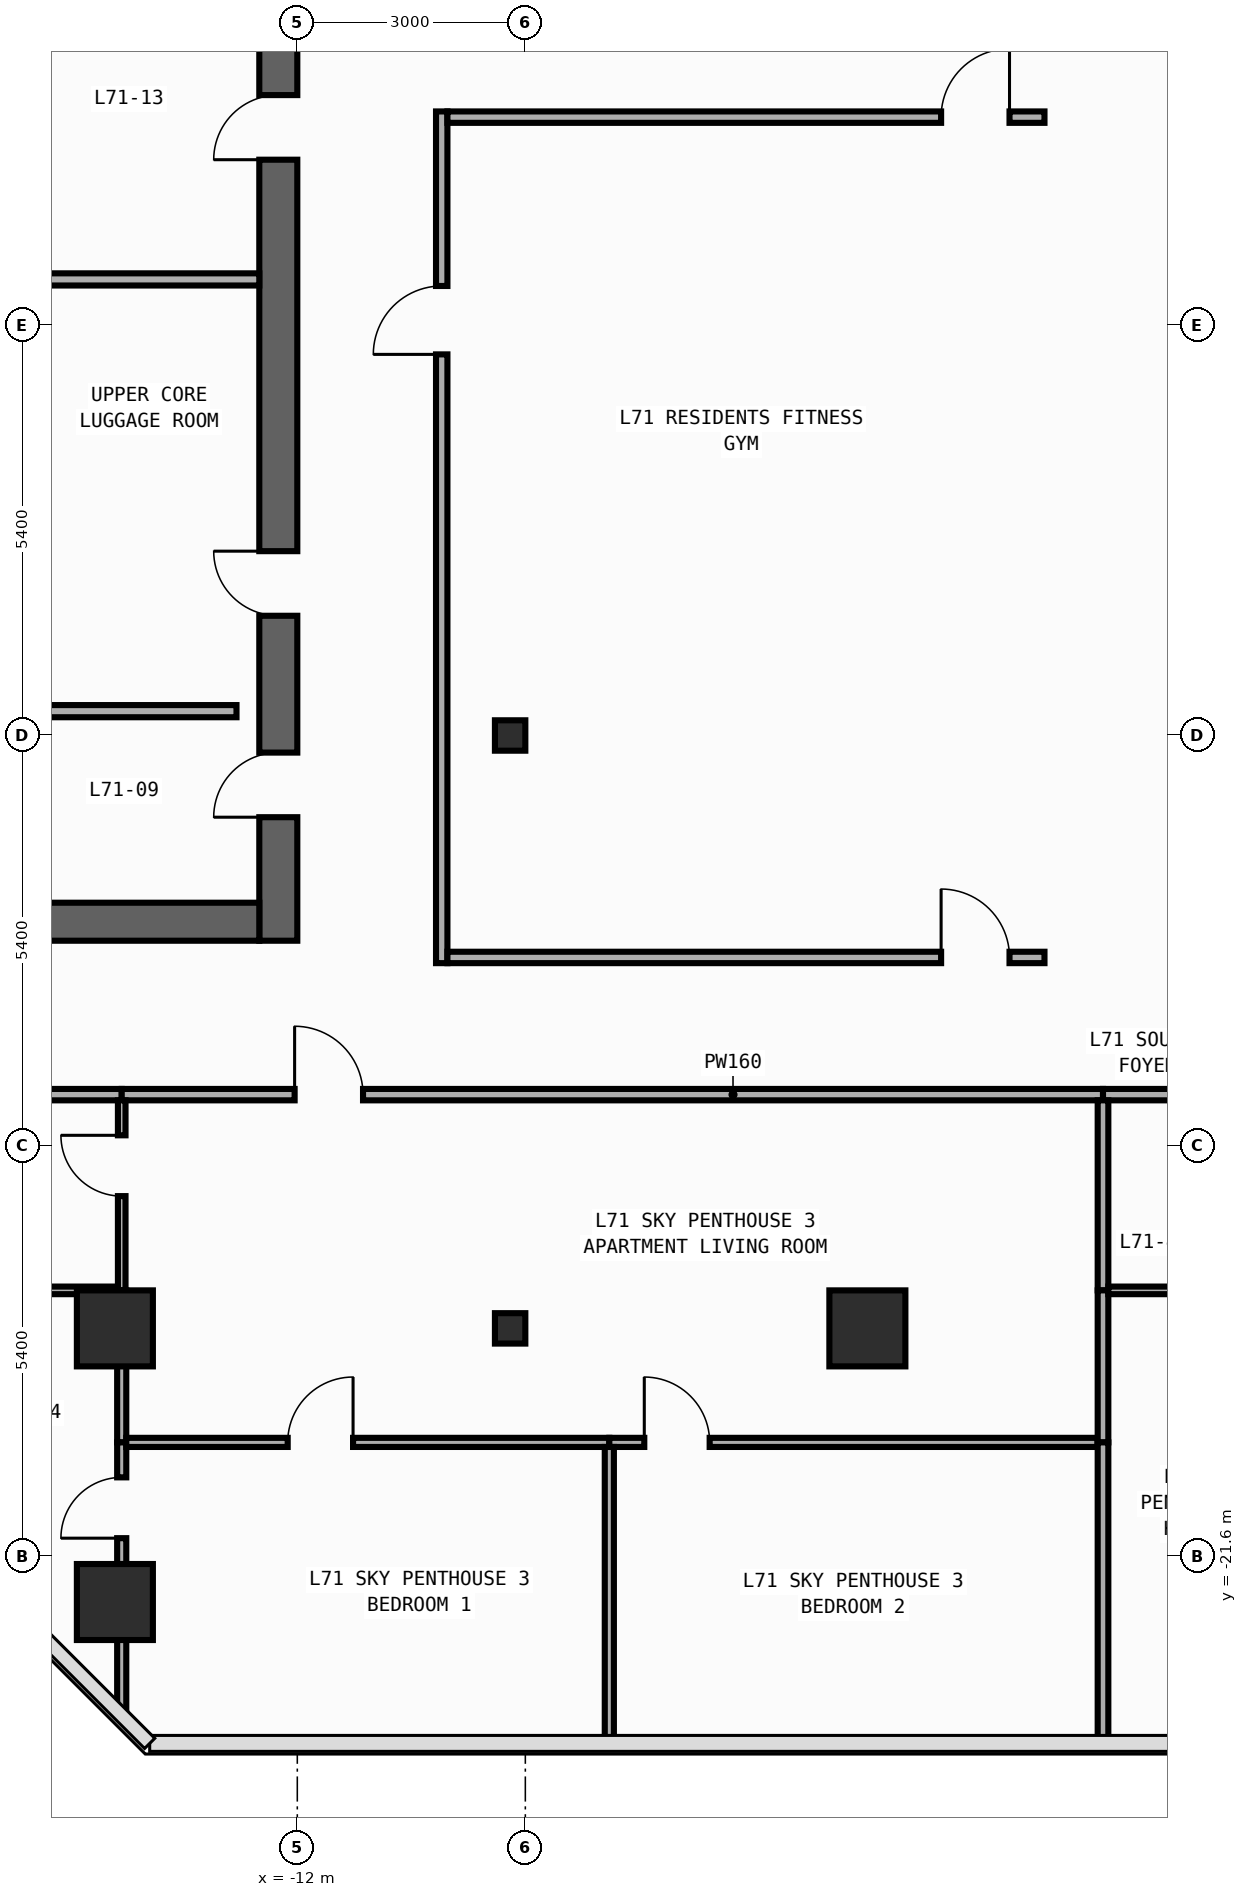
"""IFC4 building model, lengths in metres.
Left out: names, types, materials, properties, quantities, classifications, styles, units other than length and angle.
Written with IfcOpenShell. Run it as: python <this file> out.ifc"""

import sys

from ifc_helpers import new_model, si_unit, direction, frame, frame_2d, origin, origin_2d, place, context, subcontext, project, spatial, rectangle, circle, i_section, extrude, element, fill, save


model = new_model("IFC4")
c1 = context("Model", 3, precision=1e-05, world=origin(), true_north=direction((0.0, 1.0)))
c2 = subcontext(c1, "Body", "Model", "MODEL_VIEW")
j1 = project(units=[si_unit("LENGTHUNIT", "METRE"), si_unit("PLANEANGLEUNIT", "RADIAN")], contexts=[c1])
p1 = place(None, origin())
s1 = spatial("IfcSite", under=j1, at=p1, CompositionType="ELEMENT")
p2 = place(p1, origin())
s2 = spatial("IfcBuilding", under=s1, at=p2, CompositionType="ELEMENT")
p3 = place(p2, frame((0.0, 0.0, 296.6)))
s3 = spatial("IfcBuildingStorey", under=s2, at=p3, CompositionType="ELEMENT", Elevation=296.6)
p4 = place(p3, frame((-12.25, -13.5, 0.0), z_axis=(0.0, 0.0, 1.0), x_axis=(0.0, 1.0, 0.0)))
e1 = element("IfcWall", 1, at=p4, inside=s3, PredefinedType="SHEAR", context=c2, shape_type="SweptSolid", body=[
    extrude(rectangle(XDim=27.0, YDim=0.5, at=frame_2d((13.5, 0.0))), origin(), (0.0, 0.0, 1.0), 3.54),
])
p5 = place(p4, frame((15.175, 0.0, 0.0)))
e2 = element("IfcOpeningElement", 2, at=p5, cuts=e1, PredefinedType="OPENING", context=c2, shape_type="SweptSolid", body=[
    extrude(rectangle(XDim=0.85, YDim=2.1, at=frame_2d((0.425, 1.05))), frame((0.0, 0.26, 0.0), z_axis=(0.0, -1.0, 0.0), x_axis=(1.0, 0.0, 0.0)), (0.0, 0.0, 1.0), 0.52),
])
p6 = place(p4, frame((21.275, 0.0, 0.0)))
e3 = element("IfcOpeningElement", 3, at=p6, cuts=e1, PredefinedType="OPENING", context=c2, shape_type="SweptSolid", body=[
    extrude(rectangle(XDim=0.85, YDim=2.1, at=frame_2d((0.425, 1.05))), frame((0.0, 0.26, 0.0), z_axis=(0.0, -1.0, 0.0), x_axis=(1.0, 0.0, 0.0)), (0.0, 0.0, 1.0), 0.52),
])
p7 = place(p4, frame((4.275, 0.0, 0.0)))
e4 = element("IfcOpeningElement", 4, at=p7, cuts=e1, PredefinedType="OPENING", context=c2, shape_type="SweptSolid", body=[
    extrude(rectangle(XDim=0.85, YDim=2.1, at=frame_2d((0.425, 1.05))), frame((0.0, 0.26, 0.0), z_axis=(0.0, -1.0, 0.0), x_axis=(1.0, 0.0, 0.0)), (0.0, 0.0, 1.0), 0.52),
])
p8 = place(p4, frame((10.275, 0.0, 0.0)))
e5 = element("IfcOpeningElement", 5, at=p8, cuts=e1, PredefinedType="OPENING", context=c2, shape_type="SweptSolid", body=[
    extrude(rectangle(XDim=0.85, YDim=2.1, at=frame_2d((0.425, 1.05))), frame((0.0, 0.26, 0.0), z_axis=(0.0, -1.0, 0.0), x_axis=(1.0, 0.0, 0.0)), (0.0, 0.0, 1.0), 0.52),
])
p9 = place(p4, frame((12.725, 0.0, 0.0)))
e6 = element("IfcOpeningElement", 6, at=p9, cuts=e1, PredefinedType="OPENING", context=c2, shape_type="SweptSolid", body=[
    extrude(rectangle(XDim=1.15, YDim=2.2, at=frame_2d((0.575, 1.1))), frame((0.0, 0.26, 0.0), z_axis=(0.0, -1.0, 0.0), x_axis=(1.0, 0.0, 0.0)), (0.0, 0.0, 1.0), 0.52),
])
p10 = place(p4, frame((1.625, 0.0, 0.0)))
e7 = element("IfcOpeningElement", 7, at=p10, cuts=e1, PredefinedType="OPENING", context=c2, shape_type="SweptSolid", body=[
    extrude(rectangle(XDim=0.85, YDim=2.1, at=frame_2d((0.425, 1.05))), frame((0.0, 0.26, 0.0), z_axis=(0.0, -1.0, 0.0), x_axis=(1.0, 0.0, 0.0)), (0.0, 0.0, 1.0), 0.52),
])
p11 = place(p3, frame((-19.9, -13.25, 0.0), z_axis=(0.0, 0.0, 1.0), x_axis=(1.0, 0.0, 0.0)))
e8 = element("IfcWall", 8, at=p11, inside=s3, PredefinedType="SHEAR", context=c2, shape_type="SweptSolid", body=[
    extrude(rectangle(XDim=7.4, YDim=0.5, at=frame_2d((3.7, 0.0))), origin(), (0.0, 0.0, 1.0), 3.54),
])
for number, where, z_axis, x_axis in (
    (9, (-9.2, -18.6, 0.0), (0.0, 0.0, 1.0), (1.0, 0.0, 0.0)),
    (10, (-9.2, -10.8, 0.0), (0.0, 0.0, 1.0), (1.0, 0.0, 0.0)),
):
    element("IfcColumn", number, at=place(p3, frame(where, z_axis=z_axis, x_axis=x_axis)), inside=s3, PredefinedType="COLUMN", context=c2, shape_type="SweptSolid", body=[
        extrude(i_section(OverallWidth=0.4, OverallDepth=0.4, WebThickness=0.013, FlangeThickness=0.021, FilletRadius=0.022, at=origin_2d()), origin(), (0.0, 0.0, 1.0), 3.8),
    ])
for number, where, z_axis, x_axis in (
    (11, (-14.4, -18.6, 0.0), (0.0, 0.0, 1.0), (1.0, 0.0, 0.0)),
    (12, (-4.5, -18.6, 0.0), (0.0, 0.0, 1.0), (1.0, 0.0, 0.0)),
    (13, (-14.4, -22.2, 0.0), (0.0, 0.0, 1.0), (1.0, 0.0, 0.0)),
):
    element("IfcColumn", number, at=place(p3, frame(where, z_axis=z_axis, x_axis=x_axis)), inside=s3, PredefinedType="COLUMN", context=c2, shape_type="SweptSolid", body=[
        extrude(circle(Radius=0.5, at=origin_2d()), origin(), (0.0, 0.0, 1.0), 3.8),
    ])
p12 = place(p3, frame((-15.4, -10.48, 0.0), z_axis=(0.0, 0.0, 1.0), x_axis=(1.0, 0.0, 0.0)))
e14 = element("IfcWall", 14, at=p12, inside=s3, PredefinedType="STANDARD", context=c2, shape_type="SweptSolid", body=[
    extrude(rectangle(XDim=2.6, YDim=0.16, at=frame_2d((1.3, 0.0))), origin(), (0.0, 0.0, 1.0), 3.54),
])
p13 = place(p3, frame((-15.4, -4.8, 0.0), z_axis=(0.0, 0.0, 1.0), x_axis=(1.0, 0.0, 0.0)))
e15 = element("IfcWall", 15, at=p13, inside=s3, PredefinedType="PARTITIONING", context=c2, shape_type="SweptSolid", body=[
    extrude(rectangle(XDim=2.9, YDim=0.16, at=frame_2d((1.45, 0.0))), origin(), (0.0, 0.0, 1.0), 3.54),
])
p14 = place(p3, frame((-10.1, -13.795, 0.0), z_axis=(0.0, 0.0, 1.0), x_axis=(0.0, 1.0, 0.0)))
e16 = element("IfcWall", 16, at=p14, inside=s3, PredefinedType="PARTITIONING", context=c2, shape_type="SweptSolid", body=[
    extrude(rectangle(XDim=11.205, YDim=0.15, at=frame_2d((5.603, 0.0))), origin(), (0.0, 0.0, 1.0), 3.54),
])
p15 = place(p14, frame((8.009, 0.0, 0.0)))
e17 = element("IfcOpeningElement", 17, at=p15, cuts=e16, PredefinedType="OPENING", context=c2, shape_type="SweptSolid", body=[
    extrude(rectangle(XDim=0.9, YDim=2.15, at=frame_2d((0.45, 1.075))), frame((0.0, 0.085, 0.0), z_axis=(0.0, -1.0, 0.0), x_axis=(1.0, 0.0, 0.0)), (0.0, 0.0, 1.0), 0.17),
])
p16 = place(p3, frame((-10.025, -2.665, 0.0), z_axis=(0.0, 0.0, 1.0), x_axis=(1.0, 0.0, 0.0)))
e18 = element("IfcWall", 18, at=p16, inside=s3, PredefinedType="PARTITIONING", context=c2, shape_type="SweptSolid", body=[
    extrude(rectangle(XDim=7.855, YDim=0.15, at=frame_2d((3.927, 0.0))), origin(), (0.0, 0.0, 1.0), 3.54),
])
p17 = place(p16, frame((6.495, 0.0, 0.0)))
e19 = element("IfcOpeningElement", 19, at=p17, cuts=e18, PredefinedType="OPENING", context=c2, shape_type="SweptSolid", body=[
    extrude(rectangle(XDim=0.9, YDim=2.15, at=frame_2d((0.45, 1.075))), frame((0.0, 0.085, 0.0), z_axis=(0.0, -1.0, 0.0), x_axis=(1.0, 0.0, 0.0)), (0.0, 0.0, 1.0), 0.17),
])
p18 = place(p3, frame((-16.98, -15.525, 0.0), z_axis=(0.0, 0.0, 1.0), x_axis=(1.0, 0.0, 0.0)))
e20 = element("IfcWall", 20, at=p18, inside=s3, PredefinedType="PARTITIONING", context=c2, shape_type="SweptSolid", body=[
    extrude(rectangle(XDim=2.67, YDim=0.15, at=frame_2d((1.335, 0.0))), origin(), (0.0, 0.0, 1.0), 3.54),
])
p19 = place(p3, frame((-14.31, -15.525, 0.0), z_axis=(0.0, 0.0, 1.0), x_axis=(1.0, 0.0, 0.0)))
e21 = element("IfcWall", 21, at=p19, inside=s3, PredefinedType="PARTITIONING", context=c2, shape_type="SweptSolid", body=[
    extrude(rectangle(XDim=12.91, YDim=0.15, at=frame_2d((6.455, 0.0))), origin(), (0.0, 0.0, 1.0), 3.54),
])
p20 = place(p19, frame((2.275, 0.0, 0.0)))
e22 = element("IfcOpeningElement", 22, at=p20, cuts=e21, PredefinedType="OPENING", context=c2, shape_type="SweptSolid", body=[
    extrude(rectangle(XDim=0.9, YDim=2.15, at=frame_2d((0.45, 1.075))), frame((0.0, 0.085, 0.0), z_axis=(0.0, -1.0, 0.0), x_axis=(1.0, 0.0, 0.0)), (0.0, 0.0, 1.0), 0.17),
])
p21 = place(p3, frame((-1.4, -15.525, 0.0), z_axis=(0.0, 0.0, 1.0), x_axis=(1.0, 0.0, 0.0)))
e23 = element("IfcWall", 23, at=p21, inside=s3, PredefinedType="PARTITIONING", context=c2, shape_type="SweptSolid", body=[
    extrude(rectangle(XDim=2.59, YDim=0.15, at=frame_2d((1.295, 0.0))), origin(), (0.0, 0.0, 1.0), 3.54),
])
p22 = place(p3, frame((-10.025, -13.72, 0.0), z_axis=(0.0, 0.0, 1.0), x_axis=(1.0, 0.0, 0.0)))
e24 = element("IfcWall", 24, at=p22, inside=s3, PredefinedType="PARTITIONING", context=c2, shape_type="SweptSolid", body=[
    extrude(rectangle(XDim=7.855, YDim=0.15, at=frame_2d((3.927, 0.0))), origin(), (0.0, 0.0, 1.0), 3.54),
])
p23 = place(p22, frame((6.495, 0.0, 0.0)))
e25 = element("IfcOpeningElement", 25, at=p23, cuts=e24, PredefinedType="OPENING", context=c2, shape_type="SweptSolid", body=[
    extrude(rectangle(XDim=0.9, YDim=2.15, at=frame_2d((0.45, 1.075))), frame((0.0, 0.085, 0.0), z_axis=(0.0, -1.0, 0.0), x_axis=(1.0, 0.0, 0.0)), (0.0, 0.0, 1.0), 0.17),
])
p24 = place(p3, frame((-16.98, -18.1, 0.0), z_axis=(0.0, 0.0, 1.0), x_axis=(1.0, 0.0, 0.0)))
e26 = element("IfcWall", 26, at=p24, inside=s3, PredefinedType="PARTITIONING", context=c2, shape_type="SweptSolid", body=[
    extrude(rectangle(XDim=2.62, YDim=0.1, at=frame_2d((1.31, 0.0))), origin(), (0.0, 0.0, 1.0), 3.54),
])
p25 = place(p3, frame((-14.31, -18.1, 0.0), z_axis=(0.0, 0.0, 1.0), x_axis=(0.0, 1.0, 0.0)))
e27 = element("IfcWall", 27, at=p25, inside=s3, PredefinedType="PARTITIONING", context=c2, shape_type="SweptSolid", body=[
    extrude(rectangle(XDim=2.5, YDim=0.1, at=frame_2d((1.25, 0.0))), origin(), (0.0, 0.0, 1.0), 2.64),
])
p26 = place(p25, frame((1.24, 0.0, 0.0)))
e28 = element("IfcOpeningElement", 28, at=p26, cuts=e27, PredefinedType="OPENING", context=c2, shape_type="SweptSolid", body=[
    extrude(rectangle(XDim=0.8, YDim=2.1, at=frame_2d((0.4, 1.05))), frame((0.0, 0.06, 0.0), z_axis=(0.0, -1.0, 0.0), x_axis=(1.0, 0.0, 0.0)), (0.0, 0.0, 1.0), 0.12),
])
p27 = place(p3, frame((-14.31, -20.1, 0.0), z_axis=(0.0, 0.0, 1.0), x_axis=(0.0, 1.0, 0.0)))
e29 = element("IfcWall", 29, at=p27, inside=s3, PredefinedType="PARTITIONING", context=c2, shape_type="SweptSolid", body=[
    extrude(rectangle(XDim=2.0, YDim=0.12, at=frame_2d((1.0, 0.0))), origin(), (0.0, 0.0, 1.0), 2.64),
])
p28 = place(p3, frame((-14.31, -23.687, 0.0), z_axis=(0.0, 0.0, 1.0), x_axis=(0.0, 1.0, 0.0)))
e30 = element("IfcWall", 30, at=p28, inside=s3, PredefinedType="PARTITIONING", context=c2, shape_type="SweptSolid", body=[
    extrude(rectangle(XDim=3.587, YDim=0.12, at=frame_2d((1.793, 0.0))), origin(), (0.0, 0.0, 1.0), 2.64),
])
p29 = place(p28, frame((2.327, 0.0, 0.0)))
e31 = element("IfcOpeningElement", 31, at=p29, cuts=e30, PredefinedType="OPENING", context=c2, shape_type="SweptSolid", body=[
    extrude(rectangle(XDim=0.8, YDim=2.1, at=frame_2d((0.4, 1.05))), frame((0.0, 0.07, 0.0), z_axis=(0.0, -1.0, 0.0), x_axis=(1.0, 0.0, 0.0)), (0.0, 0.0, 1.0), 0.14),
])
p30 = place(p3, frame((-14.25, -20.1, 0.0), z_axis=(0.0, 0.0, 1.0), x_axis=(1.0, 0.0, 0.0)))
e32 = element("IfcWall", 32, at=p30, inside=s3, PredefinedType="PARTITIONING", context=c2, shape_type="SweptSolid", body=[
    extrude(rectangle(XDim=6.355, YDim=0.12, at=frame_2d((3.177, 0.0))), origin(), (0.0, 0.0, 1.0), 3.54),
])
p31 = place(p30, frame((2.124, 0.0, 0.0)))
e33 = element("IfcOpeningElement", 33, at=p31, cuts=e32, PredefinedType="OPENING", context=c2, shape_type="SweptSolid", body=[
    extrude(rectangle(XDim=0.86, YDim=2.15, at=frame_2d((0.43, 1.075))), frame((0.0, 0.07, 0.0), z_axis=(0.0, -1.0, 0.0), x_axis=(1.0, 0.0, 0.0)), (0.0, 0.0, 1.0), 0.14),
])
p32 = place(p3, frame((-7.895, -20.1, 0.0), z_axis=(0.0, 0.0, 1.0), x_axis=(1.0, 0.0, 0.0)))
e34 = element("IfcWall", 34, at=p32, inside=s3, PredefinedType="PARTITIONING", context=c2, shape_type="SweptSolid", body=[
    extrude(rectangle(XDim=6.425, YDim=0.12, at=frame_2d((3.212, 0.0))), origin(), (0.0, 0.0, 1.0), 3.54),
])
p33 = place(p32, frame((0.46, 0.0, 0.0)))
e35 = element("IfcOpeningElement", 35, at=p33, cuts=e34, PredefinedType="OPENING", context=c2, shape_type="SweptSolid", body=[
    extrude(rectangle(XDim=0.86, YDim=2.15, at=frame_2d((0.43, 1.075))), frame((0.0, 0.07, 0.0), z_axis=(0.0, -1.0, 0.0), x_axis=(1.0, 0.0, 0.0)), (0.0, 0.0, 1.0), 0.14),
])
p34 = place(p3, frame((-1.4, -18.1, 0.0), z_axis=(0.0, 0.0, 1.0), x_axis=(0.0, 1.0, 0.0)))
e36 = element("IfcWall", 36, at=p34, inside=s3, PredefinedType="PARTITIONING", context=c2, shape_type="SweptSolid", body=[
    extrude(rectangle(XDim=2.5, YDim=0.14, at=frame_2d((1.25, 0.0))), origin(), (0.0, 0.0, 1.0), 3.54),
])
p35 = place(p3, frame((-1.4, -20.1, 0.0), z_axis=(0.0, 0.0, 1.0), x_axis=(0.0, 1.0, 0.0)))
e37 = element("IfcWall", 37, at=p35, inside=s3, PredefinedType="PARTITIONING", context=c2, shape_type="SweptSolid", body=[
    extrude(rectangle(XDim=2.0, YDim=0.14, at=frame_2d((1.0, 0.0))), origin(), (0.0, 0.0, 1.0), 3.54),
])
p36 = place(p3, frame((-7.895, -24.055, 0.0), z_axis=(0.0, 0.0, 1.0), x_axis=(0.0, 1.0, 0.0)))
e38 = element("IfcWall", 38, at=p36, inside=s3, PredefinedType="PARTITIONING", context=c2, shape_type="SweptSolid", body=[
    extrude(rectangle(XDim=3.895, YDim=0.12, at=frame_2d((1.948, 0.0))), origin(), (0.0, 0.0, 1.0), 3.54),
])
p37 = place(p3, frame((-1.4, -24.055, 0.0), z_axis=(0.0, 0.0, 1.0), x_axis=(0.0, 1.0, 0.0)))
e39 = element("IfcWall", 39, at=p37, inside=s3, PredefinedType="PARTITIONING", context=c2, shape_type="SweptSolid", body=[
    extrude(rectangle(XDim=3.955, YDim=0.14, at=frame_2d((1.978, 0.0))), origin(), (0.0, 0.0, 1.0), 3.54),
])
p38 = place(p3, frame((-1.33, -18.1, 0.0), z_axis=(0.0, 0.0, 1.0), x_axis=(1.0, 0.0, 0.0)))
e40 = element("IfcWall", 40, at=p38, inside=s3, PredefinedType="PARTITIONING", context=c2, shape_type="SweptSolid", body=[
    extrude(rectangle(XDim=2.47, YDim=0.1, at=frame_2d((1.235, 0.0))), origin(), (0.0, 0.0, 1.0), 3.54),
])
p39 = place(p7, origin())
e41 = element("IfcDoor", 41, at=p39, inside=s3, OperationType="SINGLE_SWING_RIGHT", PredefinedType="DOOR", context=c2, shape_type="SweptSolid", body=[
    extrude(rectangle(XDim=0.85, YDim=2.1, at=frame_2d((0.425, 1.05))), frame((0.0, 0.025, 0.0), z_axis=(0.0, -1.0, 0.0), x_axis=(1.0, 0.0, 0.0)), (0.0, 0.0, 1.0), 0.05),
])
fill(e4, e41)
p40 = place(p8, origin())
e42 = element("IfcDoor", 42, at=p40, inside=s3, OperationType="SINGLE_SWING_LEFT", PredefinedType="DOOR", context=c2, shape_type="SweptSolid", body=[
    extrude(rectangle(XDim=0.85, YDim=2.1, at=frame_2d((0.425, 1.05))), frame((0.0, 0.025, 0.0), z_axis=(0.0, -1.0, 0.0), x_axis=(1.0, 0.0, 0.0)), (0.0, 0.0, 1.0), 0.05),
])
fill(e5, e42)
p41 = place(p10, origin())
e43 = element("IfcDoor", 43, at=p41, inside=s3, OperationType="SINGLE_SWING_LEFT", PredefinedType="DOOR", context=c2, shape_type="SweptSolid", body=[
    extrude(rectangle(XDim=0.85, YDim=2.1, at=frame_2d((0.425, 1.05))), frame((0.0, 0.025, 0.0), z_axis=(0.0, -1.0, 0.0), x_axis=(1.0, 0.0, 0.0)), (0.0, 0.0, 1.0), 0.05),
])
fill(e7, e43)
p42 = place(p15, origin())
e44 = element("IfcDoor", 44, at=p42, inside=s3, OperationType="SINGLE_SWING_LEFT", PredefinedType="DOOR", context=c2, shape_type="SweptSolid", body=[
    extrude(rectangle(XDim=0.9, YDim=2.15, at=frame_2d((0.45, 1.075))), frame((0.0, 0.025, 0.0), z_axis=(0.0, -1.0, 0.0), x_axis=(1.0, 0.0, 0.0)), (0.0, 0.0, 1.0), 0.05),
])
fill(e17, e44)
p43 = place(p17, origin())
e45 = element("IfcDoor", 45, at=p43, inside=s3, OperationType="SINGLE_SWING_RIGHT", PredefinedType="DOOR", context=c2, shape_type="SweptSolid", body=[
    extrude(rectangle(XDim=0.9, YDim=2.15, at=frame_2d((0.45, 1.075))), frame((0.0, 0.025, 0.0), z_axis=(0.0, -1.0, 0.0), x_axis=(1.0, 0.0, 0.0)), (0.0, 0.0, 1.0), 0.05),
])
fill(e19, e45)
p44 = place(p20, origin())
e46 = element("IfcDoor", 46, at=p44, inside=s3, OperationType="SINGLE_SWING_LEFT", PredefinedType="DOOR", context=c2, shape_type="SweptSolid", body=[
    extrude(rectangle(XDim=0.9, YDim=2.15, at=frame_2d((0.45, 1.075))), frame((0.0, 0.025, 0.0), z_axis=(0.0, -1.0, 0.0), x_axis=(1.0, 0.0, 0.0)), (0.0, 0.0, 1.0), 0.05),
])
fill(e22, e46)
p45 = place(p23, origin())
e47 = element("IfcDoor", 47, at=p45, inside=s3, OperationType="SINGLE_SWING_LEFT", PredefinedType="DOOR", context=c2, shape_type="SweptSolid", body=[
    extrude(rectangle(XDim=0.9, YDim=2.15, at=frame_2d((0.45, 1.075))), frame((0.0, 0.025, 0.0), z_axis=(0.0, -1.0, 0.0), x_axis=(1.0, 0.0, 0.0)), (0.0, 0.0, 1.0), 0.05),
])
fill(e25, e47)
p46 = place(p26, origin())
e48 = element("IfcDoor", 48, at=p46, inside=s3, OperationType="SINGLE_SWING_RIGHT", PredefinedType="DOOR", context=c2, shape_type="SweptSolid", body=[
    extrude(rectangle(XDim=0.8, YDim=2.1, at=frame_2d((0.4, 1.05))), frame((0.0, 0.025, 0.0), z_axis=(0.0, -1.0, 0.0), x_axis=(1.0, 0.0, 0.0)), (0.0, 0.0, 1.0), 0.05),
])
fill(e28, e48)
p47 = place(p31, origin())
e49 = element("IfcDoor", 49, at=p47, inside=s3, OperationType="SINGLE_SWING_RIGHT", PredefinedType="DOOR", context=c2, shape_type="SweptSolid", body=[
    extrude(rectangle(XDim=0.86, YDim=2.15, at=frame_2d((0.43, 1.075))), frame((0.0, 0.025, 0.0), z_axis=(0.0, -1.0, 0.0), x_axis=(1.0, 0.0, 0.0)), (0.0, 0.0, 1.0), 0.05),
])
fill(e33, e49)
p48 = place(p33, origin())
e50 = element("IfcDoor", 50, at=p48, inside=s3, OperationType="SINGLE_SWING_LEFT", PredefinedType="DOOR", context=c2, shape_type="SweptSolid", body=[
    extrude(rectangle(XDim=0.86, YDim=2.15, at=frame_2d((0.43, 1.075))), frame((0.0, 0.025, 0.0), z_axis=(0.0, -1.0, 0.0), x_axis=(1.0, 0.0, 0.0)), (0.0, 0.0, 1.0), 0.05),
])
fill(e35, e50)
p49 = place(p29, origin())
e51 = element("IfcDoor", 51, at=p49, inside=s3, OperationType="SINGLE_SWING_LEFT", PredefinedType="DOOR", context=c2, shape_type="SweptSolid", body=[
    extrude(rectangle(XDim=0.8, YDim=2.1, at=frame_2d((0.4, 1.05))), frame((0.0, 0.025, 0.0), z_axis=(0.0, -1.0, 0.0), x_axis=(1.0, 0.0, 0.0)), (0.0, 0.0, 1.0), 0.05),
])
fill(e31, e51)
save(model, sys.argv[1])
